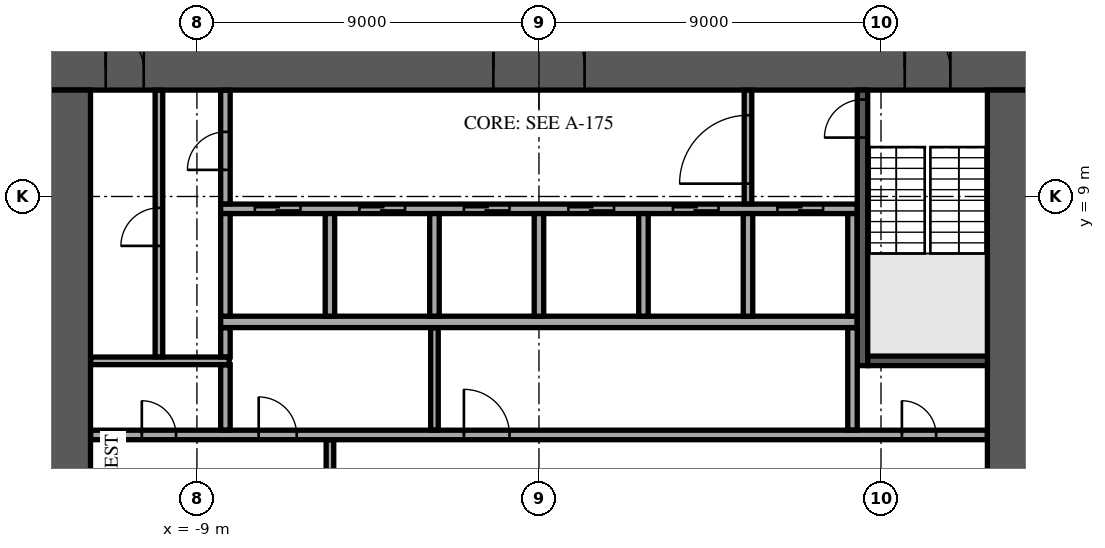
"""IFC4 building model, lengths in metres.
Left out: names, types, materials, properties, quantities, classifications, styles, units other than length and angle.
Written with IfcOpenShell. Run it as: python <this file> out.ifc"""

import sys

from ifc_helpers import new_model, si_unit, direction, frame, frame_2d, origin, place, context, subcontext, project, spatial, rectangle, extrude, element, fill, save


model = new_model("IFC4")
c1 = context("Model", 3, precision=1e-05, world=origin(), true_north=direction((0.0, 1.0)))
c2 = subcontext(c1, "Body", "Model", "MODEL_VIEW")
j1 = project(units=[si_unit("LENGTHUNIT", "METRE"), si_unit("PLANEANGLEUNIT", "RADIAN")], contexts=[c1])
p1 = place(None, origin())
s1 = spatial("IfcSite", under=j1, at=p1, CompositionType="ELEMENT")
p2 = place(p1, origin())
s2 = spatial("IfcBuilding", under=s1, at=p2, CompositionType="ELEMENT")
p3 = place(p2, frame((0.0, 0.0, 122.1)))
s3 = spatial("IfcBuildingStorey", under=s2, at=p3, CompositionType="ELEMENT", Elevation=122.1)
p4 = place(p3, frame((-12.9, 12.35, 0.0), z_axis=(0.0, 0.0, 1.0), x_axis=(1.0, 0.0, 0.0)))
e1 = element("IfcWall", 1, at=p4, inside=s3, PredefinedType="SHEAR", context=c2, shape_type="SweptSolid", body=[
    extrude(rectangle(XDim=25.8, YDim=1.1, at=frame_2d((12.9, 0.0))), origin(), (0.0, 0.0, 1.0), 3.58),
])
p5 = place(p4, frame((11.7, 0.0, 0.0)))
e2 = element("IfcOpeningElement", 2, at=p5, cuts=e1, PredefinedType="OPENING", context=c2, shape_type="SweptSolid", body=[
    extrude(rectangle(XDim=2.4, YDim=2.4, at=frame_2d((1.2, 1.2))), frame((0.0, 0.56, 0.0), z_axis=(0.0, -1.0, 0.0), x_axis=(1.0, 0.0, 0.0)), (0.0, 0.0, 1.0), 1.12),
])
p6 = place(p4, frame((22.525, 0.0, 0.0)))
e3 = element("IfcOpeningElement", 3, at=p6, cuts=e1, PredefinedType="OPENING", context=c2, shape_type="SweptSolid", body=[
    extrude(rectangle(XDim=1.2, YDim=2.1, at=frame_2d((0.6, 1.05))), frame((0.0, 0.56, 0.0), z_axis=(0.0, -1.0, 0.0), x_axis=(1.0, 0.0, 0.0)), (0.0, 0.0, 1.0), 1.12),
])
p7 = place(p4, frame((1.5, 0.0, 0.0)))
e4 = element("IfcOpeningElement", 4, at=p7, cuts=e1, PredefinedType="OPENING", context=c2, shape_type="SweptSolid", body=[
    extrude(rectangle(XDim=1.0, YDim=2.1, at=frame_2d((0.5, 1.05))), frame((0.0, 0.56, 0.0), z_axis=(0.0, -1.0, 0.0), x_axis=(1.0, 0.0, 0.0)), (0.0, 0.0, 1.0), 1.12),
])
p8 = place(p3, frame((12.35, -11.8, 0.0), z_axis=(0.0, 0.0, 1.0), x_axis=(0.0, 1.0, 0.0)))
e5 = element("IfcWall", 5, at=p8, inside=s3, PredefinedType="SHEAR", context=c2, shape_type="SweptSolid", body=[
    extrude(rectangle(XDim=23.6, YDim=1.1, at=frame_2d((11.8, 0.0))), origin(), (0.0, 0.0, 1.0), 3.58),
])
p9 = place(p8, frame((10.6, 0.0, 0.0)))
e6 = element("IfcOpeningElement", 6, at=p9, cuts=e5, PredefinedType="OPENING", context=c2, shape_type="SweptSolid", body=[
    extrude(rectangle(XDim=2.4, YDim=2.4, at=frame_2d((1.2, 1.2))), frame((0.0, 0.56, 0.0), z_axis=(0.0, -1.0, 0.0), x_axis=(1.0, 0.0, 0.0)), (0.0, 0.0, 1.0), 1.12),
])
p10 = place(p3, frame((-12.35, -11.8, 0.0), z_axis=(0.0, 0.0, 1.0), x_axis=(0.0, 1.0, 0.0)))
e7 = element("IfcWall", 7, at=p10, inside=s3, PredefinedType="SHEAR", context=c2, shape_type="SweptSolid", body=[
    extrude(rectangle(XDim=23.6, YDim=1.1, at=frame_2d((11.8, 0.0))), origin(), (0.0, 0.0, 1.0), 3.58),
])
p11 = place(p10, frame((10.6, 0.0, 0.0)))
e8 = element("IfcOpeningElement", 8, at=p11, cuts=e7, PredefinedType="OPENING", context=c2, shape_type="SweptSolid", body=[
    extrude(rectangle(XDim=2.4, YDim=2.4, at=frame_2d((1.2, 1.2))), frame((0.0, 0.56, 0.0), z_axis=(0.0, -1.0, 0.0), x_axis=(1.0, 0.0, 0.0)), (0.0, 0.0, 1.0), 1.12),
])
p12 = place(p3, frame((-8.375, 5.7, 0.0), z_axis=(0.0, 0.0, 1.0), x_axis=(1.0, 0.0, 0.0)))
e9 = element("IfcWall", 9, at=p12, inside=s3, PredefinedType="SOLIDWALL", context=c2, shape_type="SweptSolid", body=[
    extrude(rectangle(XDim=16.75, YDim=0.3, at=frame_2d((8.375, 0.0))), origin(), (0.0, 0.0, 1.0), 3.58),
])
p13 = place(p3, frame((-8.375, 8.675, 0.0), z_axis=(0.0, 0.0, 1.0), x_axis=(1.0, 0.0, 0.0)))
e10 = element("IfcWall", 10, at=p13, inside=s3, PredefinedType="SOLIDWALL", context=c2, shape_type="SweptSolid", body=[
    extrude(rectangle(XDim=16.75, YDim=0.25, at=frame_2d((8.375, 0.0))), origin(), (0.0, 0.0, 1.0), 3.58),
])
p14 = place(p13, frame((0.9, 0.0, 0.0)))
e11 = element("IfcOpeningElement", 11, at=p14, cuts=e10, PredefinedType="OPENING", context=c2, shape_type="SweptSolid", body=[
    extrude(rectangle(XDim=1.2, YDim=2.1, at=frame_2d((0.6, 1.05))), frame((0.0, 0.135, 0.0), z_axis=(0.0, -1.0, 0.0), x_axis=(1.0, 0.0, 0.0)), (0.0, 0.0, 1.0), 0.27),
])
p15 = place(p13, frame((3.65, 0.0, 0.0)))
e12 = element("IfcOpeningElement", 12, at=p15, cuts=e10, PredefinedType="OPENING", context=c2, shape_type="SweptSolid", body=[
    extrude(rectangle(XDim=1.2, YDim=2.1, at=frame_2d((0.6, 1.05))), frame((0.0, 0.135, 0.0), z_axis=(0.0, -1.0, 0.0), x_axis=(1.0, 0.0, 0.0)), (0.0, 0.0, 1.0), 0.27),
])
p16 = place(p13, frame((6.4, 0.0, 0.0)))
e13 = element("IfcOpeningElement", 13, at=p16, cuts=e10, PredefinedType="OPENING", context=c2, shape_type="SweptSolid", body=[
    extrude(rectangle(XDim=1.2, YDim=2.1, at=frame_2d((0.6, 1.05))), frame((0.0, 0.135, 0.0), z_axis=(0.0, -1.0, 0.0), x_axis=(1.0, 0.0, 0.0)), (0.0, 0.0, 1.0), 0.27),
])
p17 = place(p13, frame((9.15, 0.0, 0.0)))
e14 = element("IfcOpeningElement", 14, at=p17, cuts=e10, PredefinedType="OPENING", context=c2, shape_type="SweptSolid", body=[
    extrude(rectangle(XDim=1.2, YDim=2.1, at=frame_2d((0.6, 1.05))), frame((0.0, 0.135, 0.0), z_axis=(0.0, -1.0, 0.0), x_axis=(1.0, 0.0, 0.0)), (0.0, 0.0, 1.0), 0.27),
])
p18 = place(p13, frame((11.9, 0.0, 0.0)))
e15 = element("IfcOpeningElement", 15, at=p18, cuts=e10, PredefinedType="OPENING", context=c2, shape_type="SweptSolid", body=[
    extrude(rectangle(XDim=1.2, YDim=2.1, at=frame_2d((0.6, 1.05))), frame((0.0, 0.135, 0.0), z_axis=(0.0, -1.0, 0.0), x_axis=(1.0, 0.0, 0.0)), (0.0, 0.0, 1.0), 0.27),
])
p19 = place(p13, frame((14.65, 0.0, 0.0)))
e16 = element("IfcOpeningElement", 16, at=p19, cuts=e10, PredefinedType="OPENING", context=c2, shape_type="SweptSolid", body=[
    extrude(rectangle(XDim=1.2, YDim=2.1, at=frame_2d((0.6, 1.05))), frame((0.0, 0.135, 0.0), z_axis=(0.0, -1.0, 0.0), x_axis=(1.0, 0.0, 0.0)), (0.0, 0.0, 1.0), 0.27),
])
for number, where, z_axis, x_axis in (
    (17, (-8.25, 5.85, 0.0), (0.0, 0.0, 1.0), (0.0, 1.0, 0.0)),
    (18, (-5.5, 5.85, 0.0), (0.0, 0.0, 1.0), (0.0, 1.0, 0.0)),
    (19, (-2.75, 5.85, 0.0), (0.0, 0.0, 1.0), (0.0, 1.0, 0.0)),
    (20, (0.0, 5.85, 0.0), (0.0, 0.0, 1.0), (0.0, 1.0, 0.0)),
    (21, (2.75, 5.85, 0.0), (0.0, 0.0, 1.0), (0.0, 1.0, 0.0)),
    (22, (5.5, 5.85, 0.0), (0.0, 0.0, 1.0), (0.0, 1.0, 0.0)),
    (23, (8.25, 5.85, 0.0), (0.0, 0.0, 1.0), (0.0, 1.0, 0.0)),
):
    element("IfcWall", number, at=place(p3, frame(where, z_axis=z_axis, x_axis=x_axis)), inside=s3, PredefinedType="SOLIDWALL", context=c2, shape_type="SweptSolid", body=[
        extrude(rectangle(XDim=2.7, YDim=0.25, at=frame_2d((1.35, 0.0))), origin(), (0.0, 0.0, 1.0), 3.58),
    ])
p20 = place(p3, frame((8.512, 4.55, 0.0), z_axis=(0.0, 0.0, 1.0), x_axis=(0.0, 1.0, 0.0)))
e24 = element("IfcWall", 24, at=p20, inside=s3, PredefinedType="SOLIDWALL", context=c2, shape_type="SweptSolid", body=[
    extrude(rectangle(XDim=7.25, YDim=0.275, at=frame_2d((3.625, 0.0))), origin(), (0.0, 0.0, 1.0), 3.58),
])
p21 = place(p20, frame((6.0, 0.0, 0.0)))
e25 = element("IfcOpeningElement", 25, at=p21, cuts=e24, PredefinedType="OPENING", context=c2, shape_type="SweptSolid", body=[
    extrude(rectangle(XDim=1.0, YDim=2.1, at=frame_2d((0.5, 1.05))), frame((0.0, 0.147, 0.0), z_axis=(0.0, -1.0, 0.0), x_axis=(1.0, 0.0, 0.0)), (0.0, 0.0, 1.0), 0.295),
])
p22 = place(p3, frame((8.65, 4.675, 0.0), z_axis=(0.0, 0.0, 1.0), x_axis=(1.0, 0.0, 0.0)))
e26 = element("IfcWall", 26, at=p22, inside=s3, PredefinedType="SOLIDWALL", context=c2, shape_type="SweptSolid", body=[
    extrude(rectangle(XDim=3.15, YDim=0.25, at=frame_2d((1.575, 0.0))), origin(), (0.0, 0.0, 1.0), 3.58),
])
p23 = place(p3, frame((-5.5, -2.595, 0.0), z_axis=(0.0, 0.0, 1.0), x_axis=(0.0, 1.0, 0.0)))
e27 = element("IfcWall", 27, at=p23, inside=s3, PredefinedType="PARTITIONING", context=c2, shape_type="SweptSolid", body=[
    extrude(rectangle(XDim=5.19, YDim=0.2, at=frame_2d((2.595, 0.0))), origin(), (0.0, 0.0, 1.0), 3.58),
])
p24 = place(p23, frame((1.395, 0.0, 0.0)))
e28 = element("IfcOpeningElement", 28, at=p24, cuts=e27, PredefinedType="OPENING", context=c2, shape_type="SweptSolid", body=[
    extrude(rectangle(XDim=2.4, YDim=2.4, at=frame_2d((1.2, 1.2))), frame((0.0, 0.11, 0.0), z_axis=(0.0, -1.0, 0.0), x_axis=(1.0, 0.0, 0.0)), (0.0, 0.0, 1.0), 0.22),
])
p25 = place(p3, frame((-11.795, 2.725, 0.0), z_axis=(0.0, 0.0, 1.0), x_axis=(1.0, 0.0, 0.0)))
e29 = element("IfcWall", 29, at=p25, inside=s3, PredefinedType="PARTITIONING", context=c2, shape_type="SweptSolid", body=[
    extrude(rectangle(XDim=23.59, YDim=0.25, at=frame_2d((11.795, 0.0))), origin(), (0.0, 0.0, 1.0), 3.58),
])
p26 = place(p25, frame((21.345, 0.0, 0.0)))
e30 = element("IfcOpeningElement", 30, at=p26, cuts=e29, PredefinedType="OPENING", context=c2, shape_type="SweptSolid", body=[
    extrude(rectangle(XDim=0.9, YDim=2.1, at=frame_2d((0.45, 1.05))), frame((0.0, 0.135, 0.0), z_axis=(0.0, -1.0, 0.0), x_axis=(1.0, 0.0, 0.0)), (0.0, 0.0, 1.0), 0.27),
])
p27 = place(p25, frame((1.345, 0.0, 0.0)))
e31 = element("IfcOpeningElement", 31, at=p27, cuts=e29, PredefinedType="OPENING", context=c2, shape_type="SweptSolid", body=[
    extrude(rectangle(XDim=0.9, YDim=2.1, at=frame_2d((0.45, 1.05))), frame((0.0, 0.135, 0.0), z_axis=(0.0, -1.0, 0.0), x_axis=(1.0, 0.0, 0.0)), (0.0, 0.0, 1.0), 0.27),
])
p28 = place(p25, frame((4.42, 0.0, 0.0)))
e32 = element("IfcOpeningElement", 32, at=p28, cuts=e29, PredefinedType="OPENING", context=c2, shape_type="SweptSolid", body=[
    extrude(rectangle(XDim=1.0, YDim=2.1, at=frame_2d((0.5, 1.05))), frame((0.0, 0.135, 0.0), z_axis=(0.0, -1.0, 0.0), x_axis=(1.0, 0.0, 0.0)), (0.0, 0.0, 1.0), 0.27),
])
p29 = place(p25, frame((9.82, 0.0, 0.0)))
e33 = element("IfcOpeningElement", 33, at=p29, cuts=e29, PredefinedType="OPENING", context=c2, shape_type="SweptSolid", body=[
    extrude(rectangle(XDim=1.2, YDim=2.1, at=frame_2d((0.6, 1.05))), frame((0.0, 0.135, 0.0), z_axis=(0.0, -1.0, 0.0), x_axis=(1.0, 0.0, 0.0)), (0.0, 0.0, 1.0), 0.27),
])
p30 = place(p3, frame((-8.25, 2.855, 0.0), z_axis=(0.0, 0.0, 1.0), x_axis=(0.0, 1.0, 0.0)))
e34 = element("IfcWall", 34, at=p30, inside=s3, PredefinedType="PARTITIONING", context=c2, shape_type="SweptSolid", body=[
    extrude(rectangle(XDim=1.715, YDim=0.25, at=frame_2d((0.857, 0.0))), origin(), (0.0, 0.0, 1.0), 3.58),
])
p31 = place(p3, frame((-2.75, 2.855, 0.0), z_axis=(0.0, 0.0, 1.0), x_axis=(0.0, 1.0, 0.0)))
e35 = element("IfcWall", 35, at=p31, inside=s3, PredefinedType="PARTITIONING", context=c2, shape_type="SweptSolid", body=[
    extrude(rectangle(XDim=2.69, YDim=0.2, at=frame_2d((1.345, 0.0))), origin(), (0.0, 0.0, 1.0), 3.58),
])
p32 = place(p3, frame((8.25, 2.855, 0.0), z_axis=(0.0, 0.0, 1.0), x_axis=(0.0, 1.0, 0.0)))
e36 = element("IfcWall", 36, at=p32, inside=s3, PredefinedType="PARTITIONING", context=c2, shape_type="SweptSolid", body=[
    extrude(rectangle(XDim=2.69, YDim=0.25, at=frame_2d((1.345, 0.0))), origin(), (0.0, 0.0, 1.0), 3.58),
])
p33 = place(p3, frame((-11.795, 4.675, 0.0), z_axis=(0.0, 0.0, 1.0), x_axis=(1.0, 0.0, 0.0)))
e37 = element("IfcWall", 37, at=p33, inside=s3, PredefinedType="PARTITIONING", context=c2, shape_type="SweptSolid", body=[
    extrude(rectangle(XDim=3.645, YDim=0.2, at=frame_2d((1.823, 0.0))), origin(), (0.0, 0.0, 1.0), 3.58),
])
p34 = place(p3, frame((-10.0, 4.78, 0.0), z_axis=(0.0, 0.0, 1.0), x_axis=(0.0, 1.0, 0.0)))
e38 = element("IfcWall", 38, at=p34, inside=s3, PredefinedType="PARTITIONING", context=c2, shape_type="SweptSolid", body=[
    extrude(rectangle(XDim=7.015, YDim=0.2, at=frame_2d((3.507, 0.0))), origin(), (0.0, 0.0, 1.0), 3.58),
])
p35 = place(p34, frame((2.92, 0.0, 0.0)))
e39 = element("IfcOpeningElement", 39, at=p35, cuts=e38, PredefinedType="OPENING", context=c2, shape_type="SweptSolid", body=[
    extrude(rectangle(XDim=1.0, YDim=2.1, at=frame_2d((0.5, 1.05))), frame((0.0, 0.11, 0.0), z_axis=(0.0, -1.0, 0.0), x_axis=(1.0, 0.0, 0.0)), (0.0, 0.0, 1.0), 0.22),
])
p36 = place(p3, frame((-8.25, 4.78, 0.0), z_axis=(0.0, 0.0, 1.0), x_axis=(0.0, 1.0, 0.0)))
e40 = element("IfcWall", 40, at=p36, inside=s3, PredefinedType="PARTITIONING", context=c2, shape_type="SweptSolid", body=[
    extrude(rectangle(XDim=0.765, YDim=0.25, at=frame_2d((0.382, 0.0))), origin(), (0.0, 0.0, 1.0), 3.58),
])
p37 = place(p3, frame((-8.25, 8.805, 0.0), z_axis=(0.0, 0.0, 1.0), x_axis=(0.0, 1.0, 0.0)))
e41 = element("IfcWall", 41, at=p37, inside=s3, PredefinedType="PARTITIONING", context=c2, shape_type="SweptSolid", body=[
    extrude(rectangle(XDim=2.99, YDim=0.25, at=frame_2d((1.495, 0.0))), origin(), (0.0, 0.0, 1.0), 3.58),
])
p38 = place(p37, frame((0.895, 0.0, 0.0)))
e42 = element("IfcOpeningElement", 42, at=p38, cuts=e41, PredefinedType="OPENING", context=c2, shape_type="SweptSolid", body=[
    extrude(rectangle(XDim=1.0, YDim=2.1, at=frame_2d((0.5, 1.05))), frame((0.0, 0.135, 0.0), z_axis=(0.0, -1.0, 0.0), x_axis=(1.0, 0.0, 0.0)), (0.0, 0.0, 1.0), 0.27),
])
p39 = place(p3, frame((5.5, 8.805, 0.0), z_axis=(0.0, 0.0, 1.0), x_axis=(0.0, 1.0, 0.0)))
e43 = element("IfcWall", 43, at=p39, inside=s3, PredefinedType="PARTITIONING", context=c2, shape_type="SweptSolid", body=[
    extrude(rectangle(XDim=2.99, YDim=0.2, at=frame_2d((1.495, 0.0))), origin(), (0.0, 0.0, 1.0), 3.58),
])
p40 = place(p39, frame((0.532, 0.0, 0.0)))
e44 = element("IfcOpeningElement", 44, at=p40, cuts=e43, PredefinedType="OPENING", context=c2, shape_type="SweptSolid", body=[
    extrude(rectangle(XDim=1.8, YDim=2.1, at=frame_2d((0.9, 1.05))), frame((0.0, 0.11, 0.0), z_axis=(0.0, -1.0, 0.0), x_axis=(1.0, 0.0, 0.0)), (0.0, 0.0, 1.0), 0.22),
])
p41 = place(p5, origin())
e45 = element("IfcDoor", 45, at=p41, inside=s3, OperationType="SINGLE_SWING_LEFT", PredefinedType="DOOR", context=c2, shape_type="SweptSolid", body=[
    extrude(rectangle(XDim=2.4, YDim=2.4, at=frame_2d((1.2, 1.2))), frame((0.0, 0.025, 0.0), z_axis=(0.0, -1.0, 0.0), x_axis=(1.0, 0.0, 0.0)), (0.0, 0.0, 1.0), 0.05),
])
fill(e2, e45)
p42 = place(p6, origin())
e46 = element("IfcDoor", 46, at=p42, inside=s3, OperationType="SINGLE_SWING_LEFT", PredefinedType="DOOR", context=c2, shape_type="SweptSolid", body=[
    extrude(rectangle(XDim=1.2, YDim=2.1, at=frame_2d((0.6, 1.05))), frame((0.0, 0.025, 0.0), z_axis=(0.0, -1.0, 0.0), x_axis=(1.0, 0.0, 0.0)), (0.0, 0.0, 1.0), 0.05),
])
fill(e3, e46)
p43 = place(p7, origin())
e47 = element("IfcDoor", 47, at=p43, inside=s3, OperationType="SINGLE_SWING_LEFT", PredefinedType="DOOR", context=c2, shape_type="SweptSolid", body=[
    extrude(rectangle(XDim=1.0, YDim=2.1, at=frame_2d((0.5, 1.05))), frame((0.0, 0.025, 0.0), z_axis=(0.0, -1.0, 0.0), x_axis=(1.0, 0.0, 0.0)), (0.0, 0.0, 1.0), 0.05),
])
fill(e4, e47)
p44 = place(p14, origin())
e48 = element("IfcDoor", 48, at=p44, inside=s3, OperationType="DOUBLE_DOOR_SLIDING", PredefinedType="DOOR", context=c2, shape_type="SweptSolid", body=[
    extrude(rectangle(XDim=1.2, YDim=2.1, at=frame_2d((0.6, 1.05))), frame((0.0, 0.025, 0.0), z_axis=(0.0, -1.0, 0.0), x_axis=(1.0, 0.0, 0.0)), (0.0, 0.0, 1.0), 0.05),
])
fill(e11, e48)
p45 = place(p15, origin())
e49 = element("IfcDoor", 49, at=p45, inside=s3, OperationType="DOUBLE_DOOR_SLIDING", PredefinedType="DOOR", context=c2, shape_type="SweptSolid", body=[
    extrude(rectangle(XDim=1.2, YDim=2.1, at=frame_2d((0.6, 1.05))), frame((0.0, 0.025, 0.0), z_axis=(0.0, -1.0, 0.0), x_axis=(1.0, 0.0, 0.0)), (0.0, 0.0, 1.0), 0.05),
])
fill(e12, e49)
p46 = place(p16, origin())
e50 = element("IfcDoor", 50, at=p46, inside=s3, OperationType="DOUBLE_DOOR_SLIDING", PredefinedType="DOOR", context=c2, shape_type="SweptSolid", body=[
    extrude(rectangle(XDim=1.2, YDim=2.1, at=frame_2d((0.6, 1.05))), frame((0.0, 0.025, 0.0), z_axis=(0.0, -1.0, 0.0), x_axis=(1.0, 0.0, 0.0)), (0.0, 0.0, 1.0), 0.05),
])
fill(e13, e50)
p47 = place(p17, origin())
e51 = element("IfcDoor", 51, at=p47, inside=s3, OperationType="DOUBLE_DOOR_SLIDING", PredefinedType="DOOR", context=c2, shape_type="SweptSolid", body=[
    extrude(rectangle(XDim=1.2, YDim=2.1, at=frame_2d((0.6, 1.05))), frame((0.0, 0.025, 0.0), z_axis=(0.0, -1.0, 0.0), x_axis=(1.0, 0.0, 0.0)), (0.0, 0.0, 1.0), 0.05),
])
fill(e14, e51)
p48 = place(p18, origin())
e52 = element("IfcDoor", 52, at=p48, inside=s3, OperationType="DOUBLE_DOOR_SLIDING", PredefinedType="DOOR", context=c2, shape_type="SweptSolid", body=[
    extrude(rectangle(XDim=1.2, YDim=2.1, at=frame_2d((0.6, 1.05))), frame((0.0, 0.025, 0.0), z_axis=(0.0, -1.0, 0.0), x_axis=(1.0, 0.0, 0.0)), (0.0, 0.0, 1.0), 0.05),
])
fill(e15, e52)
p49 = place(p19, origin())
e53 = element("IfcDoor", 53, at=p49, inside=s3, OperationType="DOUBLE_DOOR_SLIDING", PredefinedType="DOOR", context=c2, shape_type="SweptSolid", body=[
    extrude(rectangle(XDim=1.2, YDim=2.1, at=frame_2d((0.6, 1.05))), frame((0.0, 0.025, 0.0), z_axis=(0.0, -1.0, 0.0), x_axis=(1.0, 0.0, 0.0)), (0.0, 0.0, 1.0), 0.05),
])
fill(e16, e53)
p50 = place(p21, origin())
e54 = element("IfcDoor", 54, at=p50, inside=s3, OperationType="SINGLE_SWING_LEFT", PredefinedType="DOOR", context=c2, shape_type="SweptSolid", body=[
    extrude(rectangle(XDim=1.0, YDim=2.1, at=frame_2d((0.5, 1.05))), frame((0.0, 0.025, 0.0), z_axis=(0.0, -1.0, 0.0), x_axis=(1.0, 0.0, 0.0)), (0.0, 0.0, 1.0), 0.05),
])
fill(e25, e54)
p51 = place(p26, origin())
e55 = element("IfcDoor", 55, at=p51, inside=s3, OperationType="SINGLE_SWING_LEFT", PredefinedType="DOOR", context=c2, shape_type="SweptSolid", body=[
    extrude(rectangle(XDim=0.9, YDim=2.1, at=frame_2d((0.45, 1.05))), frame((0.0, 0.025, 0.0), z_axis=(0.0, -1.0, 0.0), x_axis=(1.0, 0.0, 0.0)), (0.0, 0.0, 1.0), 0.05),
])
fill(e30, e55)
p52 = place(p27, origin())
e56 = element("IfcDoor", 56, at=p52, inside=s3, OperationType="SINGLE_SWING_LEFT", PredefinedType="DOOR", context=c2, shape_type="SweptSolid", body=[
    extrude(rectangle(XDim=0.9, YDim=2.1, at=frame_2d((0.45, 1.05))), frame((0.0, 0.025, 0.0), z_axis=(0.0, -1.0, 0.0), x_axis=(1.0, 0.0, 0.0)), (0.0, 0.0, 1.0), 0.05),
])
fill(e31, e56)
p53 = place(p35, origin())
e57 = element("IfcDoor", 57, at=p53, inside=s3, OperationType="SINGLE_SWING_LEFT", PredefinedType="DOOR", context=c2, shape_type="SweptSolid", body=[
    extrude(rectangle(XDim=1.0, YDim=2.1, at=frame_2d((0.5, 1.05))), frame((0.0, 0.025, 0.0), z_axis=(0.0, -1.0, 0.0), x_axis=(1.0, 0.0, 0.0)), (0.0, 0.0, 1.0), 0.05),
])
fill(e39, e57)
p54 = place(p38, origin())
e58 = element("IfcDoor", 58, at=p54, inside=s3, OperationType="SINGLE_SWING_LEFT", PredefinedType="DOOR", context=c2, shape_type="SweptSolid", body=[
    extrude(rectangle(XDim=1.0, YDim=2.1, at=frame_2d((0.5, 1.05))), frame((0.0, 0.025, 0.0), z_axis=(0.0, -1.0, 0.0), x_axis=(1.0, 0.0, 0.0)), (0.0, 0.0, 1.0), 0.05),
])
fill(e42, e58)
p55 = place(p28, origin())
e59 = element("IfcDoor", 59, at=p55, inside=s3, OperationType="SINGLE_SWING_LEFT", PredefinedType="DOOR", context=c2, shape_type="SweptSolid", body=[
    extrude(rectangle(XDim=1.0, YDim=2.1, at=frame_2d((0.5, 1.05))), frame((0.0, 0.025, 0.0), z_axis=(0.0, -1.0, 0.0), x_axis=(1.0, 0.0, 0.0)), (0.0, 0.0, 1.0), 0.05),
])
fill(e32, e59)
p56 = place(p29, origin())
e60 = element("IfcDoor", 60, at=p56, inside=s3, OperationType="SINGLE_SWING_LEFT", PredefinedType="DOOR", context=c2, shape_type="SweptSolid", body=[
    extrude(rectangle(XDim=1.2, YDim=2.1, at=frame_2d((0.6, 1.05))), frame((0.0, 0.025, 0.0), z_axis=(0.0, -1.0, 0.0), x_axis=(1.0, 0.0, 0.0)), (0.0, 0.0, 1.0), 0.05),
])
fill(e33, e60)
p57 = place(p40, origin())
e61 = element("IfcDoor", 61, at=p57, inside=s3, OperationType="SINGLE_SWING_LEFT", PredefinedType="DOOR", context=c2, shape_type="SweptSolid", body=[
    extrude(rectangle(XDim=1.8, YDim=2.1, at=frame_2d((0.9, 1.05))), frame((0.0, 0.025, 0.0), z_axis=(0.0, -1.0, 0.0), x_axis=(1.0, 0.0, 0.0)), (0.0, 0.0, 1.0), 0.05),
])
fill(e44, e61)
save(model, sys.argv[1])
